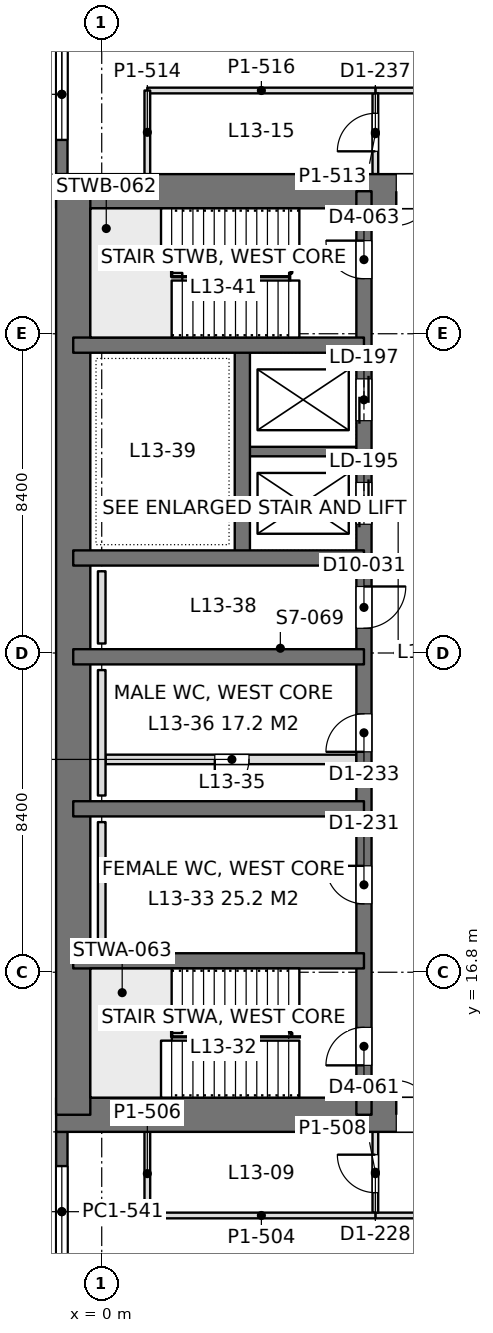
"""IFC4 building model, lengths in metres.
Left out: names, types, materials, properties, quantities, classifications, styles, units other than length and angle.
Written with IfcOpenShell. Run it as: python <this file> out.ifc"""

import sys

from ifc_helpers import new_model, si_unit, direction, frame, frame_2d, origin, place, context, subcontext, project, spatial, rectangle, extrude, element, fill, save


model = new_model("IFC4")
c1 = context("Model", 3, precision=1e-05, world=origin(), true_north=direction((0.0, 1.0)))
c2 = subcontext(c1, "Body", "Model", "MODEL_VIEW")
j1 = project(units=[si_unit("LENGTHUNIT", "METRE"), si_unit("PLANEANGLEUNIT", "RADIAN")], contexts=[c1])
p1 = place(None, origin())
s1 = spatial("IfcSite", under=j1, at=p1, CompositionType="ELEMENT")
p2 = place(p1, origin())
s2 = spatial("IfcBuilding", under=s1, at=p2, CompositionType="ELEMENT")
p3 = place(p2, frame((0.0, 0.0, 59.4)))
s3 = spatial("IfcBuildingStorey", under=s2, at=p3, CompositionType="ELEMENT", Elevation=59.4)
p4 = place(p3, frame((-1.2, 13.05, 0.0), z_axis=(0.0, 0.0, 1.0), x_axis=(1.0, 0.0, 0.0)))
e1 = element("IfcWall", 1, at=p4, inside=s3, PredefinedType="SHEAR", context=c2, shape_type="SweptSolid", body=[
    extrude(rectangle(XDim=18.0, YDim=0.9, at=frame_2d((9.0, 0.0))), origin(), (0.0, 0.0, 1.0), 4.5),
])
p5 = place(p4, frame((8.95, 0.0, 0.0)))
e2 = element("IfcOpeningElement", 2, at=p5, cuts=e1, PredefinedType="OPENING", context=c2, shape_type="SweptSolid", body=[
    extrude(rectangle(XDim=1.8, YDim=2.4, at=frame_2d((0.9, 1.2))), frame((0.0, 0.46, 0.0), z_axis=(0.0, -1.0, 0.0), x_axis=(1.0, 0.0, 0.0)), (0.0, 0.0, 1.0), 0.92),
])
p6 = place(p3, frame((-1.2, 37.35, 0.0), z_axis=(0.0, 0.0, 1.0), x_axis=(1.0, 0.0, 0.0)))
e3 = element("IfcWall", 3, at=p6, inside=s3, PredefinedType="SHEAR", context=c2, shape_type="SweptSolid", body=[
    extrude(rectangle(XDim=18.0, YDim=0.9, at=frame_2d((9.0, 0.0))), origin(), (0.0, 0.0, 1.0), 4.5),
])
p7 = place(p6, frame((8.95, 0.0, 0.0)))
e4 = element("IfcOpeningElement", 4, at=p7, cuts=e3, PredefinedType="OPENING", context=c2, shape_type="SweptSolid", body=[
    extrude(rectangle(XDim=1.8, YDim=2.4, at=frame_2d((0.9, 1.2))), frame((0.0, 0.46, 0.0), z_axis=(0.0, -1.0, 0.0), x_axis=(1.0, 0.0, 0.0)), (0.0, 0.0, 1.0), 0.92),
])
p8 = place(p3, frame((-0.75, 13.05, 0.0), z_axis=(0.0, 0.0, 1.0), x_axis=(0.0, 1.0, 0.0)))
e5 = element("IfcWall", 5, at=p8, inside=s3, PredefinedType="SHEAR", context=c2, shape_type="SweptSolid", body=[
    extrude(rectangle(XDim=24.3, YDim=0.9, at=frame_2d((12.15, 0.0))), origin(), (0.0, 0.0, 1.0), 4.5),
])
p9 = place(p3, frame((6.9, 13.05, 0.0), z_axis=(0.0, 0.0, 1.0), x_axis=(0.0, 1.0, 0.0)))
e6 = element("IfcWall", 6, at=p9, inside=s3, PredefinedType="SHEAR", context=c2, shape_type="SweptSolid", body=[
    extrude(rectangle(XDim=24.3, YDim=0.4, at=frame_2d((12.15, 0.0))), origin(), (0.0, 0.0, 1.0), 4.5),
])
p10 = place(p9, frame((1.3, 0.0, 0.0)))
e7 = element("IfcOpeningElement", 7, at=p10, cuts=e6, PredefinedType="OPENING", context=c2, shape_type="SweptSolid", body=[
    extrude(rectangle(XDim=1.0, YDim=2.2, at=frame_2d((0.5, 1.1))), frame((0.0, 0.21, 0.0), z_axis=(0.0, -1.0, 0.0), x_axis=(1.0, 0.0, 0.0)), (0.0, 0.0, 1.0), 0.42),
])
p11 = place(p9, frame((22.0, 0.0, 0.0)))
e8 = element("IfcOpeningElement", 8, at=p11, cuts=e6, PredefinedType="OPENING", context=c2, shape_type="SweptSolid", body=[
    extrude(rectangle(XDim=1.0, YDim=2.2, at=frame_2d((0.5, 1.1))), frame((0.0, 0.21, 0.0), z_axis=(0.0, -1.0, 0.0), x_axis=(1.0, 0.0, 0.0)), (0.0, 0.0, 1.0), 0.42),
])
p12 = place(p9, frame((5.55, 0.0, 0.0)))
e9 = element("IfcOpeningElement", 9, at=p12, cuts=e6, PredefinedType="OPENING", context=c2, shape_type="SweptSolid", body=[
    extrude(rectangle(XDim=1.0, YDim=2.2, at=frame_2d((0.5, 1.1))), frame((0.0, 0.21, 0.0), z_axis=(0.0, -1.0, 0.0), x_axis=(1.0, 0.0, 0.0)), (0.0, 0.0, 1.0), 0.42),
])
p13 = place(p9, frame((9.55, 0.0, 0.0)))
e10 = element("IfcOpeningElement", 10, at=p13, cuts=e6, PredefinedType="OPENING", context=c2, shape_type="SweptSolid", body=[
    extrude(rectangle(XDim=1.0, YDim=2.2, at=frame_2d((0.5, 1.1))), frame((0.0, 0.21, 0.0), z_axis=(0.0, -1.0, 0.0), x_axis=(1.0, 0.0, 0.0)), (0.0, 0.0, 1.0), 0.42),
])
p14 = place(p9, frame((12.8, 0.0, 0.0)))
e11 = element("IfcOpeningElement", 11, at=p14, cuts=e6, PredefinedType="OPENING", context=c2, shape_type="SweptSolid", body=[
    extrude(rectangle(XDim=1.1, YDim=2.2, at=frame_2d((0.55, 1.1))), frame((0.0, 0.21, 0.0), z_axis=(0.0, -1.0, 0.0), x_axis=(1.0, 0.0, 0.0)), (0.0, 0.0, 1.0), 0.42),
])
p15 = place(p9, frame((15.538, 0.0, 0.0)))
e12 = element("IfcOpeningElement", 12, at=p15, cuts=e6, PredefinedType="OPENING", context=c2, shape_type="SweptSolid", body=[
    extrude(rectangle(XDim=1.1, YDim=2.2, at=frame_2d((0.55, 1.1))), frame((0.0, 0.21, 0.0), z_axis=(0.0, -1.0, 0.0), x_axis=(1.0, 0.0, 0.0)), (0.0, 0.0, 1.0), 0.42),
])
p16 = place(p9, frame((18.262, 0.0, 0.0)))
e13 = element("IfcOpeningElement", 13, at=p16, cuts=e6, PredefinedType="OPENING", context=c2, shape_type="SweptSolid", body=[
    extrude(rectangle(XDim=1.1, YDim=2.2, at=frame_2d((0.55, 1.1))), frame((0.0, 0.21, 0.0), z_axis=(0.0, -1.0, 0.0), x_axis=(1.0, 0.0, 0.0)), (0.0, 0.0, 1.0), 0.42),
])
for number, where, z_axis, x_axis in (
    (14, (-0.75, 17.1, 0.0), (0.0, 0.0, 1.0), (1.0, 0.0, 0.0)),
    (15, (-0.75, 21.1, 0.0), (0.0, 0.0, 1.0), (1.0, 0.0, 0.0)),
    (16, (-0.75, 25.1, 0.0), (0.0, 0.0, 1.0), (1.0, 0.0, 0.0)),
    (17, (-0.75, 27.7, 0.0), (0.0, 0.0, 1.0), (1.0, 0.0, 0.0)),
    (18, (-0.75, 33.3, 0.0), (0.0, 0.0, 1.0), (1.0, 0.0, 0.0)),
):
    element("IfcWall", number, at=place(p3, frame(where, z_axis=z_axis, x_axis=x_axis)), inside=s3, PredefinedType="SHEAR", context=c2, shape_type="SweptSolid", body=[
        extrude(rectangle(XDim=7.65, YDim=0.4, at=frame_2d((3.825, 0.0))), origin(), (0.0, 0.0, 1.0), 4.5),
    ])
p17 = place(p3, frame((3.7, 27.7, 0.0), z_axis=(0.0, 0.0, 1.0), x_axis=(0.0, 1.0, 0.0)))
e19 = element("IfcWall", 19, at=p17, inside=s3, PredefinedType="SHEAR", context=c2, shape_type="SweptSolid", body=[
    extrude(rectangle(XDim=5.6, YDim=0.4, at=frame_2d((2.8, 0.0))), origin(), (0.0, 0.0, 1.0), 4.5),
])
p18 = place(p3, frame((3.7, 30.5, 0.0), z_axis=(0.0, 0.0, 1.0), x_axis=(1.0, 0.0, 0.0)))
e20 = element("IfcWall", 20, at=p18, inside=s3, PredefinedType="SHEAR", context=c2, shape_type="SweptSolid", body=[
    extrude(rectangle(XDim=3.2, YDim=0.25, at=frame_2d((1.6, 0.0))), origin(), (0.0, 0.0, 1.0), 4.5),
])
p19 = place(p3, frame((-1.05, 8.4, 0.0), z_axis=(0.0, 0.0, 1.0), x_axis=(0.0, 1.0, 0.0)))
e21 = element("IfcWall", 21, at=p19, inside=s3, PredefinedType="SOLIDWALL", context=c2, shape_type="SweptSolid", body=[
    extrude(rectangle(XDim=4.2, YDim=0.3, at=frame_2d((2.1, 0.0))), origin(), (0.0, 0.0, 1.0), 4.34),
])
p20 = place(p19, frame((0.9, 0.0, 0.9)))
e22 = element("IfcOpeningElement", 22, at=p20, cuts=e21, PredefinedType="OPENING", context=c2, shape_type="SweptSolid", body=[
    extrude(rectangle(XDim=2.4, YDim=1.9, at=frame_2d((1.2, 0.95))), frame((0.0, 0.16, 0.0), z_axis=(0.0, -1.0, 0.0), x_axis=(1.0, 0.0, 0.0)), (0.0, 0.0, 1.0), 0.32),
])
p21 = place(p3, frame((-1.05, 37.8, 0.0), z_axis=(0.0, 0.0, 1.0), x_axis=(0.0, 1.0, 0.0)))
e23 = element("IfcWall", 23, at=p21, inside=s3, PredefinedType="SOLIDWALL", context=c2, shape_type="SweptSolid", body=[
    extrude(rectangle(XDim=4.2, YDim=0.3, at=frame_2d((2.1, 0.0))), origin(), (0.0, 0.0, 1.0), 4.34),
])
p22 = place(p21, frame((0.9, 0.0, 0.9)))
e24 = element("IfcOpeningElement", 24, at=p22, cuts=e23, PredefinedType="OPENING", context=c2, shape_type="SweptSolid", body=[
    extrude(rectangle(XDim=2.4, YDim=1.9, at=frame_2d((1.2, 0.95))), frame((0.0, 0.16, 0.0), z_axis=(0.0, -1.0, 0.0), x_axis=(1.0, 0.0, 0.0)), (0.0, 0.0, 1.0), 0.32),
])
p23 = place(p3, frame((7.198, 10.4, 0.0), z_axis=(0.0, 0.0, 1.0), x_axis=(1.0, 0.0, 0.0)))
e25 = element("IfcWall", 25, at=p23, inside=s3, PredefinedType="PARTITIONING", context=c2, shape_type="SweptSolid", body=[
    extrude(rectangle(XDim=42.002, YDim=0.15, at=frame_2d((21.001, 0.0))), origin(), (0.0, 0.0, 1.0), 3.74),
])
p24 = place(p23, frame((4.502, 0.0, 0.0)))
e26 = element("IfcOpeningElement", 26, at=p24, cuts=e25, PredefinedType="OPENING", context=c2, shape_type="SweptSolid", body=[
    extrude(rectangle(XDim=1.8, YDim=2.2, at=frame_2d((0.9, 1.1))), frame((0.0, 0.085, 0.0), z_axis=(0.0, -1.0, 0.0), x_axis=(1.0, 0.0, 0.0)), (0.0, 0.0, 1.0), 0.17),
])
p25 = place(p23, frame((12.902, 0.0, 0.0)))
e27 = element("IfcOpeningElement", 27, at=p25, cuts=e25, PredefinedType="OPENING", context=c2, shape_type="SweptSolid", body=[
    extrude(rectangle(XDim=1.8, YDim=2.2, at=frame_2d((0.9, 1.1))), frame((0.0, 0.085, 0.0), z_axis=(0.0, -1.0, 0.0), x_axis=(1.0, 0.0, 0.0)), (0.0, 0.0, 1.0), 0.17),
])
p26 = place(p23, frame((21.302, 0.0, 0.0)))
e28 = element("IfcOpeningElement", 28, at=p26, cuts=e25, PredefinedType="OPENING", context=c2, shape_type="SweptSolid", body=[
    extrude(rectangle(XDim=1.8, YDim=2.2, at=frame_2d((0.9, 1.1))), frame((0.0, 0.085, 0.0), z_axis=(0.0, -1.0, 0.0), x_axis=(1.0, 0.0, 0.0)), (0.0, 0.0, 1.0), 0.17),
])
p27 = place(p23, frame((29.702, 0.0, 0.0)))
e29 = element("IfcOpeningElement", 29, at=p27, cuts=e25, PredefinedType="OPENING", context=c2, shape_type="SweptSolid", body=[
    extrude(rectangle(XDim=1.8, YDim=2.2, at=frame_2d((0.9, 1.1))), frame((0.0, 0.085, 0.0), z_axis=(0.0, -1.0, 0.0), x_axis=(1.0, 0.0, 0.0)), (0.0, 0.0, 1.0), 0.17),
])
p28 = place(p23, frame((38.102, 0.0, 0.0)))
e30 = element("IfcOpeningElement", 30, at=p28, cuts=e25, PredefinedType="OPENING", context=c2, shape_type="SweptSolid", body=[
    extrude(rectangle(XDim=1.8, YDim=2.2, at=frame_2d((0.9, 1.1))), frame((0.0, 0.085, 0.0), z_axis=(0.0, -1.0, 0.0), x_axis=(1.0, 0.0, 0.0)), (0.0, 0.0, 1.0), 0.17),
])
p29 = place(p3, frame((7.2, 10.474, 0.0), z_axis=(0.0, 0.0, 1.0), x_axis=(0.0, 1.0, 0.0)))
e31 = element("IfcWall", 31, at=p29, inside=s3, PredefinedType="PARTITIONING", context=c2, shape_type="SweptSolid", body=[
    extrude(rectangle(XDim=2.128, YDim=0.15, at=frame_2d((1.064, 0.0))), origin(), (0.0, 0.0, 1.0), 4.34),
])
p30 = place(p29, frame((0.526, 0.0, 0.0)))
e32 = element("IfcOpeningElement", 32, at=p30, cuts=e31, PredefinedType="OPENING", context=c2, shape_type="SweptSolid", body=[
    extrude(rectangle(XDim=1.0, YDim=2.2, at=frame_2d((0.5, 1.1))), frame((0.0, 0.085, 0.0), z_axis=(0.0, -1.0, 0.0), x_axis=(1.0, 0.0, 0.0)), (0.0, 0.0, 1.0), 0.17),
])
p31 = place(p3, frame((1.2, 10.4, 0.0), z_axis=(0.0, 0.0, 1.0), x_axis=(1.0, 0.0, 0.0)))
e33 = element("IfcWall", 33, at=p31, inside=s3, PredefinedType="PARTITIONING", context=c2, shape_type="SweptSolid", body=[
    extrude(rectangle(XDim=6.002, YDim=0.15, at=frame_2d((3.001, 0.0))), origin(), (0.0, 0.0, 1.0), 4.34),
])
p32 = place(p3, frame((1.2, 10.4, 0.0), z_axis=(0.0, 0.0, 1.0), x_axis=(0.0, 1.0, 0.0)))
e34 = element("IfcWall", 34, at=p32, inside=s3, PredefinedType="PARTITIONING", context=c2, shape_type="SweptSolid", body=[
    extrude(rectangle(XDim=2.202, YDim=0.15, at=frame_2d((1.101, 0.0))), origin(), (0.0, 0.0, 1.0), 4.34),
])
p33 = place(p3, frame((7.198, 40.0, 0.0), z_axis=(0.0, 0.0, 1.0), x_axis=(1.0, 0.0, 0.0)))
e35 = element("IfcWall", 35, at=p33, inside=s3, PredefinedType="PARTITIONING", context=c2, shape_type="SweptSolid", body=[
    extrude(rectangle(XDim=42.002, YDim=0.15, at=frame_2d((21.001, 0.0))), origin(), (0.0, 0.0, 1.0), 3.74),
])
p34 = place(p33, frame((4.502, 0.0, 0.0)))
e36 = element("IfcOpeningElement", 36, at=p34, cuts=e35, PredefinedType="OPENING", context=c2, shape_type="SweptSolid", body=[
    extrude(rectangle(XDim=1.8, YDim=2.2, at=frame_2d((0.9, 1.1))), frame((0.0, 0.085, 0.0), z_axis=(0.0, -1.0, 0.0), x_axis=(1.0, 0.0, 0.0)), (0.0, 0.0, 1.0), 0.17),
])
p35 = place(p33, frame((12.902, 0.0, 0.0)))
e37 = element("IfcOpeningElement", 37, at=p35, cuts=e35, PredefinedType="OPENING", context=c2, shape_type="SweptSolid", body=[
    extrude(rectangle(XDim=1.8, YDim=2.2, at=frame_2d((0.9, 1.1))), frame((0.0, 0.085, 0.0), z_axis=(0.0, -1.0, 0.0), x_axis=(1.0, 0.0, 0.0)), (0.0, 0.0, 1.0), 0.17),
])
p36 = place(p33, frame((21.302, 0.0, 0.0)))
e38 = element("IfcOpeningElement", 38, at=p36, cuts=e35, PredefinedType="OPENING", context=c2, shape_type="SweptSolid", body=[
    extrude(rectangle(XDim=1.8, YDim=2.2, at=frame_2d((0.9, 1.1))), frame((0.0, 0.085, 0.0), z_axis=(0.0, -1.0, 0.0), x_axis=(1.0, 0.0, 0.0)), (0.0, 0.0, 1.0), 0.17),
])
p37 = place(p33, frame((29.702, 0.0, 0.0)))
e39 = element("IfcOpeningElement", 39, at=p37, cuts=e35, PredefinedType="OPENING", context=c2, shape_type="SweptSolid", body=[
    extrude(rectangle(XDim=1.8, YDim=2.2, at=frame_2d((0.9, 1.1))), frame((0.0, 0.085, 0.0), z_axis=(0.0, -1.0, 0.0), x_axis=(1.0, 0.0, 0.0)), (0.0, 0.0, 1.0), 0.17),
])
p38 = place(p33, frame((38.102, 0.0, 0.0)))
e40 = element("IfcOpeningElement", 40, at=p38, cuts=e35, PredefinedType="OPENING", context=c2, shape_type="SweptSolid", body=[
    extrude(rectangle(XDim=1.8, YDim=2.2, at=frame_2d((0.9, 1.1))), frame((0.0, 0.085, 0.0), z_axis=(0.0, -1.0, 0.0), x_axis=(1.0, 0.0, 0.0)), (0.0, 0.0, 1.0), 0.17),
])
p39 = place(p3, frame((7.2, 37.8, 0.0), z_axis=(0.0, 0.0, 1.0), x_axis=(0.0, 1.0, 0.0)))
e41 = element("IfcWall", 41, at=p39, inside=s3, PredefinedType="PARTITIONING", context=c2, shape_type="SweptSolid", body=[
    extrude(rectangle(XDim=2.126, YDim=0.15, at=frame_2d((1.063, 0.0))), origin(), (0.0, 0.0, 1.0), 4.34),
])
p40 = place(p39, frame((0.6, 0.0, 0.0)))
e42 = element("IfcOpeningElement", 42, at=p40, cuts=e41, PredefinedType="OPENING", context=c2, shape_type="SweptSolid", body=[
    extrude(rectangle(XDim=1.0, YDim=2.2, at=frame_2d((0.5, 1.1))), frame((0.0, 0.085, 0.0), z_axis=(0.0, -1.0, 0.0), x_axis=(1.0, 0.0, 0.0)), (0.0, 0.0, 1.0), 0.17),
])
p41 = place(p3, frame((1.2, 40.0, 0.0), z_axis=(0.0, 0.0, 1.0), x_axis=(1.0, 0.0, 0.0)))
e43 = element("IfcWall", 43, at=p41, inside=s3, PredefinedType="PARTITIONING", context=c2, shape_type="SweptSolid", body=[
    extrude(rectangle(XDim=6.002, YDim=0.15, at=frame_2d((3.001, 0.0))), origin(), (0.0, 0.0, 1.0), 3.98),
])
p42 = place(p3, frame((1.2, 37.8, 0.0), z_axis=(0.0, 0.0, 1.0), x_axis=(0.0, 1.0, 0.0)))
e44 = element("IfcWall", 44, at=p42, inside=s3, PredefinedType="PARTITIONING", context=c2, shape_type="SweptSolid", body=[
    extrude(rectangle(XDim=2.2, YDim=0.15, at=frame_2d((1.1, 0.0))), origin(), (0.0, 0.0, 1.0), 4.34),
])
p43 = place(p3, frame((0.1, 22.4, 0.0), z_axis=(0.0, 0.0, 1.0), x_axis=(1.0, 0.0, 0.0)))
e45 = element("IfcWall", 45, at=p43, inside=s3, PredefinedType="PARTITIONING", context=c2, shape_type="SweptSolid", body=[
    extrude(rectangle(XDim=6.6, YDim=0.25, at=frame_2d((3.3, 0.0))), origin(), (0.0, 0.0, 1.0), 4.3),
])
p44 = place(p43, frame((2.875, 0.0, 0.0)))
e46 = element("IfcOpeningElement", 46, at=p44, cuts=e45, PredefinedType="OPENING", context=c2, shape_type="SweptSolid", body=[
    extrude(rectangle(XDim=0.9, YDim=2.2, at=frame_2d((0.45, 1.1))), frame((0.0, 0.135, 0.0), z_axis=(0.0, -1.0, 0.0), x_axis=(1.0, 0.0, 0.0)), (0.0, 0.0, 1.0), 0.27),
])
for number, where, z_axis, x_axis in (
    (47, (0.0, 17.45, 0.0), (0.0, 0.0, 1.0), (0.0, 1.0, 0.0)),
    (48, (0.0, 21.45, 0.0), (0.0, 0.0, 1.0), (0.0, 1.0, 0.0)),
):
    element("IfcWall", number, at=place(p3, frame(where, z_axis=z_axis, x_axis=x_axis)), inside=s3, PredefinedType="PLUMBINGWALL", context=c2, shape_type="SweptSolid", body=[
        extrude(rectangle(XDim=3.3, YDim=0.2, at=frame_2d((1.65, 0.0))), origin(), (0.0, 0.0, 1.0), 1.2),
    ])
p45 = place(p3, frame((0.0, 25.45, 0.0), z_axis=(0.0, 0.0, 1.0), x_axis=(0.0, 1.0, 0.0)))
e49 = element("IfcWall", 49, at=p45, inside=s3, PredefinedType="PLUMBINGWALL", context=c2, shape_type="SweptSolid", body=[
    extrude(rectangle(XDim=1.9, YDim=0.2, at=frame_2d((0.95, 0.0))), origin(), (0.0, 0.0, 1.0), 1.2),
])
p46 = place(p20, origin())
e50 = element("IfcWindow", 50, at=p46, inside=s3, PartitioningType="SINGLE_PANEL", PredefinedType="WINDOW", context=c2, shape_type="SweptSolid", body=[
    extrude(rectangle(XDim=2.4, YDim=1.9, at=frame_2d((1.2, 0.95))), frame((0.0, 0.03, 0.0), z_axis=(0.0, -1.0, 0.0), x_axis=(1.0, 0.0, 0.0)), (0.0, 0.0, 1.0), 0.06),
])
fill(e22, e50)
p47 = place(p22, origin())
e51 = element("IfcWindow", 51, at=p47, inside=s3, PartitioningType="SINGLE_PANEL", PredefinedType="WINDOW", context=c2, shape_type="SweptSolid", body=[
    extrude(rectangle(XDim=2.4, YDim=1.9, at=frame_2d((1.2, 0.95))), frame((0.0, 0.03, 0.0), z_axis=(0.0, -1.0, 0.0), x_axis=(1.0, 0.0, 0.0)), (0.0, 0.0, 1.0), 0.06),
])
fill(e24, e51)
p48 = place(p5, origin())
e52 = element("IfcDoor", 52, at=p48, inside=s3, OperationType="DOUBLE_DOOR_SINGLE_SWING", PredefinedType="DOOR", context=c2, shape_type="SweptSolid", body=[
    extrude(rectangle(XDim=1.8, YDim=2.4, at=frame_2d((0.9, 1.2))), frame((0.0, 0.025, 0.0), z_axis=(0.0, -1.0, 0.0), x_axis=(1.0, 0.0, 0.0)), (0.0, 0.0, 1.0), 0.05),
])
fill(e2, e52)
p49 = place(p7, frame((1.8, 0.0, 0.0), z_axis=(0.0, 0.0, 1.0), x_axis=(-1.0, 0.0, 0.0)))
e53 = element("IfcDoor", 53, at=p49, inside=s3, OperationType="DOUBLE_DOOR_SINGLE_SWING", PredefinedType="DOOR", context=c2, shape_type="SweptSolid", body=[
    extrude(rectangle(XDim=1.8, YDim=2.4, at=frame_2d((0.9, 1.2))), frame((0.0, 0.025, 0.0), z_axis=(0.0, -1.0, 0.0), x_axis=(1.0, 0.0, 0.0)), (0.0, 0.0, 1.0), 0.05),
])
fill(e4, e53)
p50 = place(p10, origin())
e54 = element("IfcDoor", 54, at=p50, inside=s3, OperationType="SINGLE_SWING_LEFT", PredefinedType="DOOR", context=c2, shape_type="SweptSolid", body=[
    extrude(rectangle(XDim=1.0, YDim=2.2, at=frame_2d((0.5, 1.1))), frame((0.0, 0.025, 0.0), z_axis=(0.0, -1.0, 0.0), x_axis=(1.0, 0.0, 0.0)), (0.0, 0.0, 1.0), 0.05),
])
fill(e7, e54)
p51 = place(p11, origin())
e55 = element("IfcDoor", 55, at=p51, inside=s3, OperationType="SINGLE_SWING_RIGHT", PredefinedType="DOOR", context=c2, shape_type="SweptSolid", body=[
    extrude(rectangle(XDim=1.0, YDim=2.2, at=frame_2d((0.5, 1.1))), frame((0.0, 0.025, 0.0), z_axis=(0.0, -1.0, 0.0), x_axis=(1.0, 0.0, 0.0)), (0.0, 0.0, 1.0), 0.05),
])
fill(e8, e55)
p52 = place(p12, origin())
e56 = element("IfcDoor", 56, at=p52, inside=s3, OperationType="SINGLE_SWING_RIGHT", PredefinedType="DOOR", context=c2, shape_type="SweptSolid", body=[
    extrude(rectangle(XDim=1.0, YDim=2.2, at=frame_2d((0.5, 1.1))), frame((0.0, 0.025, 0.0), z_axis=(0.0, -1.0, 0.0), x_axis=(1.0, 0.0, 0.0)), (0.0, 0.0, 1.0), 0.05),
])
fill(e9, e56)
p53 = place(p13, origin())
e57 = element("IfcDoor", 57, at=p53, inside=s3, OperationType="SINGLE_SWING_LEFT", PredefinedType="DOOR", context=c2, shape_type="SweptSolid", body=[
    extrude(rectangle(XDim=1.0, YDim=2.2, at=frame_2d((0.5, 1.1))), frame((0.0, 0.025, 0.0), z_axis=(0.0, -1.0, 0.0), x_axis=(1.0, 0.0, 0.0)), (0.0, 0.0, 1.0), 0.05),
])
fill(e10, e57)
p54 = place(p14, frame((1.1, 0.0, 0.0), z_axis=(0.0, 0.0, 1.0), x_axis=(-1.0, 0.0, 0.0)))
e58 = element("IfcDoor", 58, at=p54, inside=s3, OperationType="SINGLE_SWING_LEFT", PredefinedType="DOOR", context=c2, shape_type="SweptSolid", body=[
    extrude(rectangle(XDim=1.1, YDim=2.2, at=frame_2d((0.55, 1.1))), frame((0.0, 0.025, 0.0), z_axis=(0.0, -1.0, 0.0), x_axis=(1.0, 0.0, 0.0)), (0.0, 0.0, 1.0), 0.05),
])
fill(e11, e58)
p55 = place(p15, origin())
e59 = element("IfcDoor", 59, at=p55, inside=s3, OperationType="DOUBLE_DOOR_SLIDING", PredefinedType="DOOR", context=c2, shape_type="SweptSolid", body=[
    extrude(rectangle(XDim=1.1, YDim=2.2, at=frame_2d((0.55, 1.1))), frame((0.0, 0.025, 0.0), z_axis=(0.0, -1.0, 0.0), x_axis=(1.0, 0.0, 0.0)), (0.0, 0.0, 1.0), 0.05),
])
fill(e12, e59)
p56 = place(p16, origin())
e60 = element("IfcDoor", 60, at=p56, inside=s3, OperationType="DOUBLE_DOOR_SLIDING", PredefinedType="DOOR", context=c2, shape_type="SweptSolid", body=[
    extrude(rectangle(XDim=1.1, YDim=2.2, at=frame_2d((0.55, 1.1))), frame((0.0, 0.025, 0.0), z_axis=(0.0, -1.0, 0.0), x_axis=(1.0, 0.0, 0.0)), (0.0, 0.0, 1.0), 0.05),
])
fill(e13, e60)
p57 = place(p30, origin())
e61 = element("IfcDoor", 61, at=p57, inside=s3, OperationType="SINGLE_SWING_RIGHT", PredefinedType="DOOR", context=c2, shape_type="SweptSolid", body=[
    extrude(rectangle(XDim=1.0, YDim=2.2, at=frame_2d((0.5, 1.1))), frame((0.0, 0.025, 0.0), z_axis=(0.0, -1.0, 0.0), x_axis=(1.0, 0.0, 0.0)), (0.0, 0.0, 1.0), 0.05),
])
fill(e32, e61)
p58 = place(p40, origin())
e62 = element("IfcDoor", 62, at=p58, inside=s3, OperationType="SINGLE_SWING_LEFT", PredefinedType="DOOR", context=c2, shape_type="SweptSolid", body=[
    extrude(rectangle(XDim=1.0, YDim=2.2, at=frame_2d((0.5, 1.1))), frame((0.0, 0.025, 0.0), z_axis=(0.0, -1.0, 0.0), x_axis=(1.0, 0.0, 0.0)), (0.0, 0.0, 1.0), 0.05),
])
fill(e42, e62)
p59 = place(p44, frame((0.9, 0.0, 0.0), z_axis=(0.0, 0.0, 1.0), x_axis=(-1.0, 0.0, 0.0)))
e63 = element("IfcDoor", 63, at=p59, inside=s3, OperationType="SINGLE_SWING_RIGHT", PredefinedType="DOOR", context=c2, shape_type="SweptSolid", body=[
    extrude(rectangle(XDim=0.9, YDim=2.2, at=frame_2d((0.45, 1.1))), frame((0.0, 0.025, 0.0), z_axis=(0.0, -1.0, 0.0), x_axis=(1.0, 0.0, 0.0)), (0.0, 0.0, 1.0), 0.05),
])
fill(e46, e63)
save(model, sys.argv[1])
